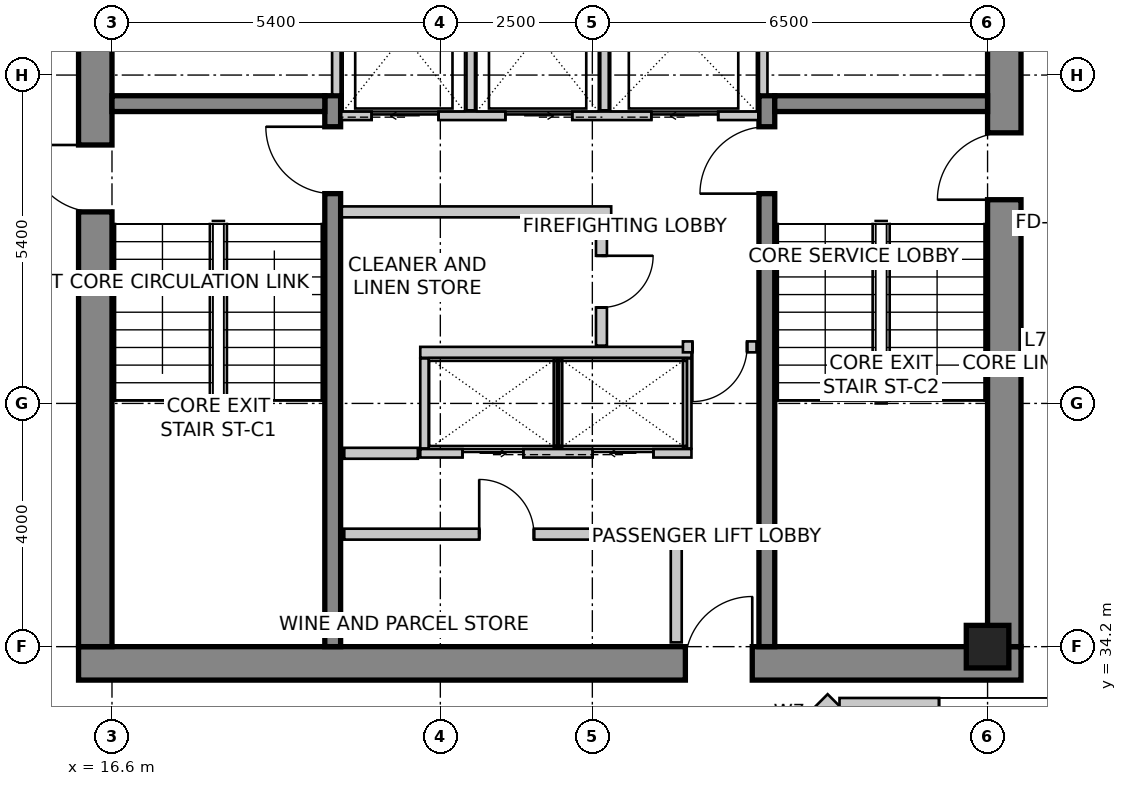
"""IFC4 building model, lengths in metres.
Left out: names, types, materials, properties, quantities, classifications, styles, units other than length and angle.
Written with IfcOpenShell. Run it as: python <this file> out.ifc"""

import sys

from ifc_helpers import new_model, si_unit, direction, frame, frame_2d, origin, origin_2d, place, context, subcontext, project, spatial, rectangle, extrude, source, transform, mapped, element, fill, save


model = new_model("IFC4")
c1 = context("Model", 3, precision=1e-05, world=origin(), true_north=direction((0.0, 1.0)))
c2 = subcontext(c1, "Body", "Model", "MODEL_VIEW")
j1 = project(units=[si_unit("LENGTHUNIT", "METRE"), si_unit("PLANEANGLEUNIT", "RADIAN")], contexts=[c1])
p1 = place(None, origin())
s1 = spatial("IfcSite", under=j1, at=p1, CompositionType="ELEMENT")
p2 = place(p1, origin())
s2 = spatial("IfcBuilding", under=s1, at=p2, CompositionType="ELEMENT")
p3 = place(p2, frame((0.0, 0.0, 274.5)))
s3 = spatial("IfcBuildingStorey", under=s2, at=p3, CompositionType="ELEMENT", Elevation=274.5)
p4 = place(p3, frame((16.05, 33.925, 0.0), z_axis=(0.0, 0.0, 1.0), x_axis=(1.0, 0.0, 0.0)))
e1 = element("IfcWall", 1, at=p4, inside=s3, PredefinedType="SHEAR", context=c2, shape_type="SweptSolid", body=[
    extrude(rectangle(XDim=15.5, YDim=0.55, at=frame_2d((7.75, 0.0))), origin(), (0.0, 0.0, 1.0), 3.6),
])
m1 = source(origin(), c2, "Body", "SweptSolid", [
    extrude(rectangle(XDim=1.1, YDim=2.15, at=frame_2d((0.55, 1.075))), frame((0.0, 0.285, 0.0), z_axis=(0.0, -1.0, 0.0), x_axis=(1.0, 0.0, 0.0)), (0.0, 0.0, 1.0), 0.57),
])
p5 = place(p4, frame((9.98, 0.0, 0.0)))
e2 = element("IfcOpeningElement", 2, at=p5, cuts=e1, PredefinedType="OPENING", context=c2, shape_type="MappedRepresentation", body=[
    mapped(m1, transform((0.0, 0.0, 0.0), scale=1.0)),
])
p6 = place(p3, frame((16.325, 34.2, 0.0), z_axis=(0.0, 0.0, 1.0), x_axis=(0.0, 1.0, 0.0)))
e3 = element("IfcWall", 3, at=p6, inside=s3, PredefinedType="SHEAR", context=c2, shape_type="SweptSolid", body=[
    extrude(rectangle(XDim=11.4, YDim=0.55, at=frame_2d((5.7, 0.0))), origin(), (0.0, 0.0, 1.0), 3.6),
])
p7 = place(p6, frame((7.15, 0.0, 0.0)))
e4 = element("IfcOpeningElement", 4, at=p7, cuts=e3, PredefinedType="OPENING", context=c2, shape_type="MappedRepresentation", body=[
    mapped(m1, transform((0.0, 0.0, 0.0), scale=1.0)),
])
p8 = place(p3, frame((31.275, 34.2, 0.0), z_axis=(0.0, 0.0, 1.0), x_axis=(0.0, 1.0, 0.0)))
e5 = element("IfcWall", 5, at=p8, inside=s3, PredefinedType="SHEAR", context=c2, shape_type="SweptSolid", body=[
    extrude(rectangle(XDim=11.4, YDim=0.55, at=frame_2d((5.7, 0.0))), origin(), (0.0, 0.0, 1.0), 3.6),
])
p9 = place(p8, frame((7.35, 0.0, 0.0)))
e6 = element("IfcOpeningElement", 6, at=p9, cuts=e5, PredefinedType="OPENING", context=c2, shape_type="MappedRepresentation", body=[
    mapped(m1, transform((0.0, 0.0, 0.0), scale=1.0)),
])
p10 = place(p3, frame((20.23, 34.2, 0.0), z_axis=(0.0, 0.0, 1.0), x_axis=(0.0, 1.0, 0.0)))
e7 = element("IfcWall", 7, at=p10, inside=s3, PredefinedType="SHEAR", context=c2, shape_type="SweptSolid", body=[
    extrude(rectangle(XDim=9.06, YDim=0.26, at=frame_2d((4.53, 0.0))), origin(), (0.0, 0.0, 1.0), 3.6),
])
m2 = source(origin(), c2, "Body", "SweptSolid", [
    extrude(rectangle(XDim=1.1, YDim=2.15, at=frame_2d((0.55, 1.075))), frame((0.0, 0.14, 0.0), z_axis=(0.0, -1.0, 0.0), x_axis=(1.0, 0.0, 0.0)), (0.0, 0.0, 1.0), 0.28),
])
p11 = place(p10, frame((7.45, 0.0, 0.0)))
e8 = element("IfcOpeningElement", 8, at=p11, cuts=e7, PredefinedType="OPENING", context=c2, shape_type="MappedRepresentation", body=[
    mapped(m2, transform((0.0, 0.0, 0.0), scale=1.0)),
])
p12 = place(p3, frame((27.37, 34.2, 0.0), z_axis=(0.0, 0.0, 1.0), x_axis=(0.0, 1.0, 0.0)))
e9 = element("IfcWall", 9, at=p12, inside=s3, PredefinedType="SHEAR", context=c2, shape_type="SweptSolid", body=[
    extrude(rectangle(XDim=9.06, YDim=0.26, at=frame_2d((4.53, 0.0))), origin(), (0.0, 0.0, 1.0), 3.6),
])
p13 = place(p12, frame((7.45, 0.0, 0.0)))
e10 = element("IfcOpeningElement", 10, at=p13, cuts=e9, PredefinedType="OPENING", context=c2, shape_type="MappedRepresentation", body=[
    mapped(m2, transform((0.0, 0.0, 0.0), scale=1.0)),
])
for number, where, z_axis, x_axis in (
    (11, (16.6, 43.13, 0.0), (0.0, 0.0, 1.0), (1.0, 0.0, 0.0)),
    (12, (27.5, 43.13, 0.0), (0.0, 0.0, 1.0), (1.0, 0.0, 0.0)),
):
    element("IfcWall", number, at=place(p3, frame(where, z_axis=z_axis, x_axis=x_axis)), inside=s3, PredefinedType="SHEAR", context=c2, shape_type="SweptSolid", body=[
        extrude(rectangle(XDim=3.5, YDim=0.26, at=frame_2d((1.75, 0.0))), origin(), (0.0, 0.0, 1.0), 3.6),
    ])
m3 = source(origin(), c2, "Body", "SweptSolid", [
    extrude(rectangle(XDim=0.7, YDim=0.7, at=origin_2d()), origin(), (0.0, 0.0, 1.0), 3.6),
])
p14 = place(p3, frame((31.0, 34.2, 0.0), z_axis=(0.0, 0.0, 1.0), x_axis=(1.0, 0.0, 0.0)))
e13 = element("IfcColumn", 13, at=p14, inside=s3, PredefinedType="COLUMN", context=c2, shape_type="MappedRepresentation", body=[
    mapped(m3, transform((0.0, 0.0, 0.0), scale=1.0)),
])
p15 = place(p3, frame((26.42, 31.256, 0.0), z_axis=(0.0, 0.0, 1.0), x_axis=(0.707106781187, 0.707106781187, 0.0)))
e14 = element("IfcWall", 14, at=p15, inside=s3, PredefinedType="SOLIDWALL", context=c2, shape_type="SweptSolid", body=[
    extrude(rectangle(XDim=2.907, YDim=0.3, at=frame_2d((1.454, 0.0))), origin(), (0.0, 0.0, 1.0), 3.35),
])
m4 = source(origin(), c2, "Body", "SweptSolid", [
    extrude(rectangle(XDim=0.9, YDim=1.6, at=frame_2d((0.45, 0.8))), frame((0.0, 0.16, 0.0), z_axis=(0.0, -1.0, 0.0), x_axis=(1.0, 0.0, 0.0)), (0.0, 0.0, 1.0), 0.32),
])
p16 = place(p15, frame((1.422, 0.0, 0.85)))
e15 = element("IfcOpeningElement", 15, at=p16, cuts=e14, PredefinedType="OPENING", context=c2, shape_type="MappedRepresentation", body=[
    mapped(m4, transform((0.0, 0.0, 0.0), scale=1.0)),
])
p17 = place(p3, frame((28.565, 33.206, 0.0), z_axis=(0.0, 0.0, 1.0), x_axis=(1.0, 0.0, 0.0)))
e16 = element("IfcWall", 16, at=p17, inside=s3, PredefinedType="SOLIDWALL", context=c2, shape_type="SweptSolid", body=[
    extrude(rectangle(XDim=13.423, YDim=0.3, at=frame_2d((6.711, 0.0))), origin(), (0.0, 0.0, 1.0), 3.35),
])
m5 = source(origin(), c2, "Body", "SweptSolid", [
    extrude(rectangle(XDim=1.6, YDim=2.15, at=frame_2d((0.8, 1.075))), frame((0.0, 0.16, 0.0), z_axis=(0.0, -1.0, 0.0), x_axis=(1.0, 0.0, 0.0)), (0.0, 0.0, 1.0), 0.32),
])
p18 = place(p17, frame((5.635, 0.0, 0.0)))
e17 = element("IfcOpeningElement", 17, at=p18, cuts=e16, PredefinedType="OPENING", context=c2, shape_type="MappedRepresentation", body=[
    mapped(m5, transform((0.0, 0.0, 0.0), scale=1.0)),
])
m6 = source(origin(), c2, "Body", "SweptSolid", [
    extrude(rectangle(XDim=2.4, YDim=2.2, at=frame_2d((1.2, 1.1))), frame((0.0, 0.16, 0.0), z_axis=(0.0, -1.0, 0.0), x_axis=(1.0, 0.0, 0.0)), (0.0, 0.0, 1.0), 0.32),
])
p19 = place(p17, frame((1.637, 0.0, 0.85)))
e18 = element("IfcOpeningElement", 18, at=p19, cuts=e16, PredefinedType="OPENING", context=c2, shape_type="MappedRepresentation", body=[
    mapped(m6, transform((0.0, 0.0, 0.0), scale=1.0)),
])
p20 = place(p17, frame((9.109, 0.0, 0.85)))
e19 = element("IfcOpeningElement", 19, at=p20, cuts=e16, PredefinedType="OPENING", context=c2, shape_type="MappedRepresentation", body=[
    mapped(m6, transform((0.0, 0.0, 0.0), scale=1.0)),
])
p21 = place(p3, frame((20.37, 42.93, 0.0), z_axis=(0.0, 0.0, 1.0), x_axis=(1.0, 0.0, 0.0)))
e20 = element("IfcWall", 20, at=p21, inside=s3, PredefinedType="SOLIDWALL", context=c2, shape_type="SweptSolid", body=[
    extrude(rectangle(XDim=6.86, YDim=0.14, at=frame_2d((3.43, 0.0))), origin(), (0.0, 0.0, 1.0), 3.35),
])
m7 = source(origin(), c2, "Body", "SweptSolid", [
    extrude(rectangle(XDim=1.1, YDim=2.15, at=frame_2d((0.55, 1.075))), frame((0.0, 0.08, 0.0), z_axis=(0.0, -1.0, 0.0), x_axis=(1.0, 0.0, 0.0)), (0.0, 0.0, 1.0), 0.16),
])
p22 = place(p21, frame((0.5, 0.0, 0.0)))
e21 = element("IfcOpeningElement", 21, at=p22, cuts=e20, PredefinedType="OPENING", context=c2, shape_type="MappedRepresentation", body=[
    mapped(m7, transform((0.0, 0.0, 0.0), scale=1.0)),
])
p23 = place(p21, frame((2.7, 0.0, 0.0)))
e22 = element("IfcOpeningElement", 22, at=p23, cuts=e20, PredefinedType="OPENING", context=c2, shape_type="MappedRepresentation", body=[
    mapped(m7, transform((0.0, 0.0, 0.0), scale=1.0)),
])
p24 = place(p21, frame((5.1, 0.0, 0.0)))
e23 = element("IfcOpeningElement", 23, at=p24, cuts=e20, PredefinedType="OPENING", context=c2, shape_type="MappedRepresentation", body=[
    mapped(m7, transform((0.0, 0.0, 0.0), scale=1.0)),
])
for number, where, z_axis, x_axis in (
    (24, (20.29, 43.28, 0.0), (0.0, 0.0, 1.0), (0.0, 1.0, 0.0)),
    (25, (27.31, 43.28, 0.0), (0.0, 0.0, 1.0), (0.0, 1.0, 0.0)),
):
    element("IfcWall", number, at=place(p3, frame(where, z_axis=z_axis, x_axis=x_axis)), inside=s3, PredefinedType="SOLIDWALL", context=c2, shape_type="SweptSolid", body=[
        extrude(rectangle(XDim=2.3, YDim=0.14, at=frame_2d((1.15, 0.0))), origin(), (0.0, 0.0, 1.0), 3.35),
    ])
for number, where, z_axis, x_axis in (
    (26, (22.5, 43.02, 0.0), (0.0, 0.0, 1.0), (0.0, 1.0, 0.0)),
    (27, (24.7, 43.02, 0.0), (0.0, 0.0, 1.0), (0.0, 1.0, 0.0)),
):
    element("IfcWall", number, at=place(p3, frame(where, z_axis=z_axis, x_axis=x_axis)), inside=s3, PredefinedType="SOLIDWALL", context=c2, shape_type="SweptSolid", body=[
        extrude(rectangle(XDim=2.56, YDim=0.14, at=frame_2d((1.28, 0.0))), origin(), (0.0, 0.0, 1.0), 3.35),
    ])
p25 = place(p3, frame((21.67, 37.38, 0.0), z_axis=(0.0, 0.0, 1.0), x_axis=(1.0, 0.0, 0.0)))
e28 = element("IfcWall", 28, at=p25, inside=s3, PredefinedType="SOLIDWALL", context=c2, shape_type="SweptSolid", body=[
    extrude(rectangle(XDim=4.46, YDim=0.14, at=frame_2d((2.23, 0.0))), origin(), (0.0, 0.0, 1.0), 3.35),
])
m8 = source(origin(), c2, "Body", "SweptSolid", [
    extrude(rectangle(XDim=1.0, YDim=2.15, at=frame_2d((0.5, 1.075))), frame((0.0, 0.08, 0.0), z_axis=(0.0, -1.0, 0.0), x_axis=(1.0, 0.0, 0.0)), (0.0, 0.0, 1.0), 0.16),
])
p26 = place(p25, frame((0.695, 0.0, 0.0)))
e29 = element("IfcOpeningElement", 29, at=p26, cuts=e28, PredefinedType="OPENING", context=c2, shape_type="MappedRepresentation", body=[
    mapped(m8, transform((0.0, 0.0, 0.0), scale=1.0)),
])
p27 = place(p25, frame((2.835, 0.0, 0.0)))
e30 = element("IfcOpeningElement", 30, at=p27, cuts=e28, PredefinedType="OPENING", context=c2, shape_type="MappedRepresentation", body=[
    mapped(m8, transform((0.0, 0.0, 0.0), scale=1.0)),
])
p28 = place(p3, frame((21.67, 39.04, 0.0), z_axis=(0.0, 0.0, 1.0), x_axis=(1.0, 0.0, 0.0)))
e31 = element("IfcWall", 31, at=p28, inside=s3, PredefinedType="SOLIDWALL", context=c2, shape_type="SweptSolid", body=[
    extrude(rectangle(XDim=4.46, YDim=0.18, at=frame_2d((2.23, 0.0))), origin(), (0.0, 0.0, 1.0), 3.35),
])
for number, where, z_axis, x_axis in (
    (32, (26.06, 37.46, 0.0), (0.0, 0.0, 1.0), (0.0, 1.0, 0.0)),
    (33, (21.74, 37.46, 0.0), (0.0, 0.0, 1.0), (0.0, 1.0, 0.0)),
    (34, (23.935, 37.46, 0.0), (0.0, 0.0, 1.0), (0.0, 1.0, 0.0)),
):
    element("IfcWall", number, at=place(p3, frame(where, z_axis=z_axis, x_axis=x_axis)), inside=s3, PredefinedType="SOLIDWALL", context=c2, shape_type="SweptSolid", body=[
        extrude(rectangle(XDim=1.48, YDim=0.14, at=frame_2d((0.74, 0.0))), origin(), (0.0, 0.0, 1.0), 3.35),
    ])
p29 = place(p3, frame((24.81, 41.35, 0.0), z_axis=(0.0, 0.0, 1.0), x_axis=(-1.0, 0.0, 0.0)))
e35 = element("IfcWall", 35, at=p29, inside=s3, PredefinedType="PARTITIONING", context=c2, shape_type="SweptSolid", body=[
    extrude(rectangle(XDim=4.43, YDim=0.18, at=frame_2d((2.215, 0.0))), origin(), (0.0, 0.0, 1.0), 3.35),
])
p30 = place(p3, frame((24.65, 41.256, 0.0), z_axis=(0.0, 0.0, 1.0), x_axis=(0.0, -1.0, 0.0)))
e36 = element("IfcWall", 36, at=p30, inside=s3, PredefinedType="PARTITIONING", context=c2, shape_type="SweptSolid", body=[
    extrude(rectangle(XDim=2.106, YDim=0.18, at=frame_2d((1.053, 0.0))), origin(), (0.0, 0.0, 1.0), 3.35),
])
m9 = source(origin(), c2, "Body", "SweptSolid", [
    extrude(rectangle(XDim=0.85, YDim=2.15, at=frame_2d((0.425, 1.075))), frame((0.0, 0.1, 0.0), z_axis=(0.0, -1.0, 0.0), x_axis=(1.0, 0.0, 0.0)), (0.0, 0.0, 1.0), 0.2),
])
p31 = place(p30, frame((0.628, 0.0, 0.0)))
e37 = element("IfcOpeningElement", 37, at=p31, cuts=e36, PredefinedType="OPENING", context=c2, shape_type="MappedRepresentation", body=[
    mapped(m9, transform((0.0, 0.0, 0.0), scale=1.0)),
])
p32 = place(p3, frame((21.63, 37.38, 0.0), z_axis=(0.0, 0.0, 1.0), x_axis=(-1.0, 0.0, 0.0)))
e38 = element("IfcWall", 38, at=p32, inside=s3, PredefinedType="PARTITIONING", context=c2, shape_type="SweptSolid", body=[
    extrude(rectangle(XDim=1.21, YDim=0.18, at=frame_2d((0.605, 0.0))), origin(), (0.0, 0.0, 1.0), 3.35),
])
p33 = place(p3, frame((27.2, 39.13, 0.0), z_axis=(0.0, 0.0, 1.0), x_axis=(-1.0, 0.0, 0.0)))
e39 = element("IfcWall", 39, at=p33, inside=s3, PredefinedType="PARTITIONING", context=c2, shape_type="SweptSolid", body=[
    extrude(rectangle(XDim=1.21, YDim=0.18, at=frame_2d((0.605, 0.0))), origin(), (0.0, 0.0, 1.0), 3.35),
])
m10 = source(origin(), c2, "Body", "SweptSolid", [
    extrude(rectangle(XDim=0.9, YDim=2.15, at=frame_2d((0.45, 1.075))), frame((0.0, 0.1, 0.0), z_axis=(0.0, -1.0, 0.0), x_axis=(1.0, 0.0, 0.0)), (0.0, 0.0, 1.0), 0.2),
])
p34 = place(p33, frame((0.155, 0.0, 0.0)))
e40 = element("IfcOpeningElement", 40, at=p34, cuts=e39, PredefinedType="OPENING", context=c2, shape_type="MappedRepresentation", body=[
    mapped(m10, transform((0.0, 0.0, 0.0), scale=1.0)),
])
p35 = place(p3, frame((20.42, 36.05, 0.0), z_axis=(0.0, 0.0, 1.0), x_axis=(1.0, 0.0, 0.0)))
e41 = element("IfcWall", 41, at=p35, inside=s3, PredefinedType="PARTITIONING", context=c2, shape_type="SweptSolid", body=[
    extrude(rectangle(XDim=5.46, YDim=0.18, at=frame_2d((2.73, 0.0))), origin(), (0.0, 0.0, 1.0), 3.35),
])
p36 = place(p35, frame((2.219, 0.0, 0.0)))
e42 = element("IfcOpeningElement", 42, at=p36, cuts=e41, PredefinedType="OPENING", context=c2, shape_type="MappedRepresentation", body=[
    mapped(m10, transform((0.0, 0.0, 0.0), scale=1.0)),
])
p37 = place(p3, frame((25.88, 35.956, 0.0), z_axis=(0.0, 0.0, 1.0), x_axis=(0.0, -1.0, 0.0)))
e43 = element("IfcWall", 43, at=p37, inside=s3, PredefinedType="PARTITIONING", context=c2, shape_type="SweptSolid", body=[
    extrude(rectangle(XDim=1.686, YDim=0.18, at=frame_2d((0.843, 0.0))), origin(), (0.0, 0.0, 1.0), 2.642),
])
m11 = source(origin(), c2, "Body", "SweptSolid", [
    extrude(rectangle(XDim=1.1, YDim=2.15, at=frame_2d((0.55, 1.075))), frame((0.0, 0.025, 0.0), z_axis=(0.0, -1.0, 0.0), x_axis=(1.0, 0.0, 0.0)), (0.0, 0.0, 1.0), 0.05),
])
p38 = place(p22, origin())
e44 = element("IfcDoor", 44, at=p38, inside=s3, OperationType="SLIDING_TO_LEFT", PredefinedType="DOOR", context=c2, shape_type="MappedRepresentation", body=[
    mapped(m11, transform((0.0, 0.0, 0.0), scale=1.0)),
])
fill(e21, e44)
p39 = place(p23, origin())
e45 = element("IfcDoor", 45, at=p39, inside=s3, OperationType="SLIDING_TO_RIGHT", PredefinedType="DOOR", context=c2, shape_type="MappedRepresentation", body=[
    mapped(m11, transform((0.0, 0.0, 0.0), scale=1.0)),
])
fill(e22, e45)
m12 = source(origin(), c2, "Body", "SweptSolid", [
    extrude(rectangle(XDim=1.1, YDim=2.15, at=frame_2d((0.55, 1.075))), frame((0.0, 0.025, 0.0), z_axis=(0.0, -1.0, 0.0), x_axis=(1.0, 0.0, 0.0)), (0.0, 0.0, 1.0), 0.05),
])
p40 = place(p24, origin())
e46 = element("IfcDoor", 46, at=p40, inside=s3, OperationType="SLIDING_TO_LEFT", PredefinedType="DOOR", context=c2, shape_type="MappedRepresentation", body=[
    mapped(m12, transform((0.0, 0.0, 0.0), scale=1.0)),
])
fill(e23, e46)
m13 = source(origin(), c2, "Body", "SweptSolid", [
    extrude(rectangle(XDim=1.0, YDim=2.15, at=frame_2d((0.5, 1.075))), frame((0.0, 0.025, 0.0), z_axis=(0.0, -1.0, 0.0), x_axis=(1.0, 0.0, 0.0)), (0.0, 0.0, 1.0), 0.05),
])
p41 = place(p26, origin())
e47 = element("IfcDoor", 47, at=p41, inside=s3, OperationType="SLIDING_TO_RIGHT", PredefinedType="DOOR", context=c2, shape_type="MappedRepresentation", body=[
    mapped(m13, transform((0.0, 0.0, 0.0), scale=1.0)),
])
fill(e29, e47)
p42 = place(p27, origin())
e48 = element("IfcDoor", 48, at=p42, inside=s3, OperationType="SLIDING_TO_LEFT", PredefinedType="DOOR", context=c2, shape_type="MappedRepresentation", body=[
    mapped(m13, transform((0.0, 0.0, 0.0), scale=1.0)),
])
fill(e30, e48)
m14 = source(origin(), c2, "Body", "SweptSolid", [
    extrude(rectangle(XDim=1.1, YDim=2.15, at=frame_2d((0.55, 1.075))), frame((0.0, 0.025, 0.0), z_axis=(0.0, -1.0, 0.0), x_axis=(1.0, 0.0, 0.0)), (0.0, 0.0, 1.0), 0.05),
])
p43 = place(p11, origin())
e49 = element("IfcDoor", 49, at=p43, inside=s3, OperationType="SINGLE_SWING_RIGHT", PredefinedType="DOOR", context=c2, shape_type="MappedRepresentation", body=[
    mapped(m14, transform((0.0, 0.0, 0.0), scale=1.0)),
])
fill(e8, e49)
p44 = place(p13, origin())
e50 = element("IfcDoor", 50, at=p44, inside=s3, OperationType="SINGLE_SWING_LEFT", PredefinedType="DOOR", context=c2, shape_type="MappedRepresentation", body=[
    mapped(m14, transform((0.0, 0.0, 0.0), scale=1.0)),
])
fill(e10, e50)
p45 = place(p7, origin())
e51 = element("IfcDoor", 51, at=p45, inside=s3, OperationType="SINGLE_SWING_RIGHT", PredefinedType="DOOR", context=c2, shape_type="MappedRepresentation", body=[
    mapped(m14, transform((0.0, 0.0, 0.0), scale=1.0)),
])
fill(e4, e51)
p46 = place(p9, origin())
e52 = element("IfcDoor", 52, at=p46, inside=s3, OperationType="SINGLE_SWING_LEFT", PredefinedType="DOOR", context=c2, shape_type="MappedRepresentation", body=[
    mapped(m14, transform((0.0, 0.0, 0.0), scale=1.0)),
])
fill(e6, e52)
p47 = place(p5, origin())
e53 = element("IfcDoor", 53, at=p47, inside=s3, OperationType="SINGLE_SWING_RIGHT", PredefinedType="DOOR", context=c2, shape_type="MappedRepresentation", body=[
    mapped(m14, transform((0.0, 0.0, 0.0), scale=1.0)),
])
fill(e2, e53)
m15 = source(origin(), c2, "Body", "SweptSolid", [
    extrude(rectangle(XDim=0.85, YDim=2.15, at=frame_2d((0.425, 1.075))), frame((0.0, 0.025, 0.0), z_axis=(0.0, -1.0, 0.0), x_axis=(1.0, 0.0, 0.0)), (0.0, 0.0, 1.0), 0.05),
])
p48 = place(p31, origin())
e54 = element("IfcDoor", 54, at=p48, inside=s3, OperationType="SINGLE_SWING_LEFT", PredefinedType="DOOR", context=c2, shape_type="MappedRepresentation", body=[
    mapped(m15, transform((0.0, 0.0, 0.0), scale=1.0)),
])
fill(e37, e54)
m16 = source(origin(), c2, "Body", "SweptSolid", [
    extrude(rectangle(XDim=0.9, YDim=2.15, at=frame_2d((0.45, 1.075))), frame((0.0, 0.025, 0.0), z_axis=(0.0, -1.0, 0.0), x_axis=(1.0, 0.0, 0.0)), (0.0, 0.0, 1.0), 0.05),
])
p49 = place(p34, origin())
e55 = element("IfcDoor", 55, at=p49, inside=s3, OperationType="SINGLE_SWING_RIGHT", PredefinedType="DOOR", context=c2, shape_type="MappedRepresentation", body=[
    mapped(m16, transform((0.0, 0.0, 0.0), scale=1.0)),
])
fill(e40, e55)
p50 = place(p36, origin())
e56 = element("IfcDoor", 56, at=p50, inside=s3, OperationType="SINGLE_SWING_LEFT", PredefinedType="DOOR", context=c2, shape_type="MappedRepresentation", body=[
    mapped(m16, transform((0.0, 0.0, 0.0), scale=1.0)),
])
fill(e42, e56)
save(model, sys.argv[1])
